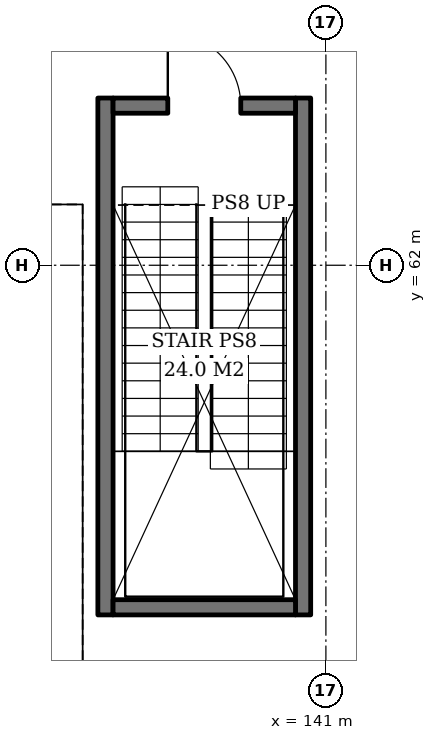
"""IFC4 building model, lengths in metres.
Left out: names, types, materials, properties, quantities, classifications, styles, units other than length and angle.
Written with IfcOpenShell. Run it as: python <this file> out.ifc"""

import sys

from ifc_helpers import new_model, si_unit, direction, frame, frame_2d, origin, place, context, subcontext, project, spatial, rectangle, extrude, element, fill, save


model = new_model("IFC4")
c1 = context("Model", 3, precision=1e-05, world=origin(), true_north=direction((0.0, 1.0)))
c2 = subcontext(c1, "Body", "Model", "MODEL_VIEW")
j1 = project(units=[si_unit("LENGTHUNIT", "METRE"), si_unit("PLANEANGLEUNIT", "RADIAN")], contexts=[c1])
p1 = place(None, origin())
s1 = spatial("IfcSite", under=j1, at=p1, CompositionType="ELEMENT")
p2 = place(p1, origin())
s2 = spatial("IfcBuilding", under=s1, at=p2, CompositionType="ELEMENT")
p3 = place(p2, frame((0.0, 0.0, 16.0)))
s3 = spatial("IfcBuildingStorey", under=s2, at=p3, CompositionType="ELEMENT", Elevation=16.0)
for number, where, z_axis, x_axis in (
    (1, (137.375, 56.25, 0.0), (0.0, 0.0, 1.0), (0.0, 1.0, 0.0)),
    (2, (140.625, 56.25, 0.0), (0.0, 0.0, 1.0), (0.0, 1.0, 0.0)),
):
    element("IfcWall", number, at=place(p3, frame(where, z_axis=z_axis, x_axis=x_axis)), inside=s3, PredefinedType="SOLIDWALL", context=c2, shape_type="SweptSolid", body=[
        extrude(rectangle(XDim=8.5, YDim=0.25, at=frame_2d((4.25, 0.0))), origin(), (0.0, 0.0, 1.0), 4.7),
    ])
p4 = place(p3, frame((137.5, 56.375, 0.0), z_axis=(0.0, 0.0, 1.0), x_axis=(1.0, 0.0, 0.0)))
e3 = element("IfcWall", 3, at=p4, inside=s3, PredefinedType="SOLIDWALL", context=c2, shape_type="SweptSolid", body=[
    extrude(rectangle(XDim=3.0, YDim=0.25, at=frame_2d((1.5, 0.0))), origin(), (0.0, 0.0, 1.0), 4.7),
])
p5 = place(p3, frame((137.5, 64.625, 0.0), z_axis=(0.0, 0.0, 1.0), x_axis=(1.0, 0.0, 0.0)))
e4 = element("IfcWall", 4, at=p5, inside=s3, PredefinedType="SOLIDWALL", context=c2, shape_type="SweptSolid", body=[
    extrude(rectangle(XDim=3.0, YDim=0.25, at=frame_2d((1.5, 0.0))), origin(), (0.0, 0.0, 1.0), 4.7),
])
p6 = place(p5, frame((0.9, 0.0, 0.0)))
e5 = element("IfcOpeningElement", 5, at=p6, cuts=e4, PredefinedType="OPENING", context=c2, shape_type="SweptSolid", body=[
    extrude(rectangle(XDim=1.2, YDim=2.1, at=frame_2d((0.6, 1.05))), frame((0.0, 0.135, 0.0), z_axis=(0.0, -1.0, 0.0), x_axis=(1.0, 0.0, 0.0)), (0.0, 0.0, 1.0), 0.27),
])
p7 = place(p6, origin())
e6 = element("IfcDoor", 6, at=p7, inside=s3, OperationType="SINGLE_SWING_LEFT", PredefinedType="DOOR", context=c2, shape_type="SweptSolid", body=[
    extrude(rectangle(XDim=1.2, YDim=2.1, at=frame_2d((0.6, 1.05))), frame((0.0, 0.025, 0.0), z_axis=(0.0, -1.0, 0.0), x_axis=(1.0, 0.0, 0.0)), (0.0, 0.0, 1.0), 0.05),
])
fill(e5, e6)
save(model, sys.argv[1])
